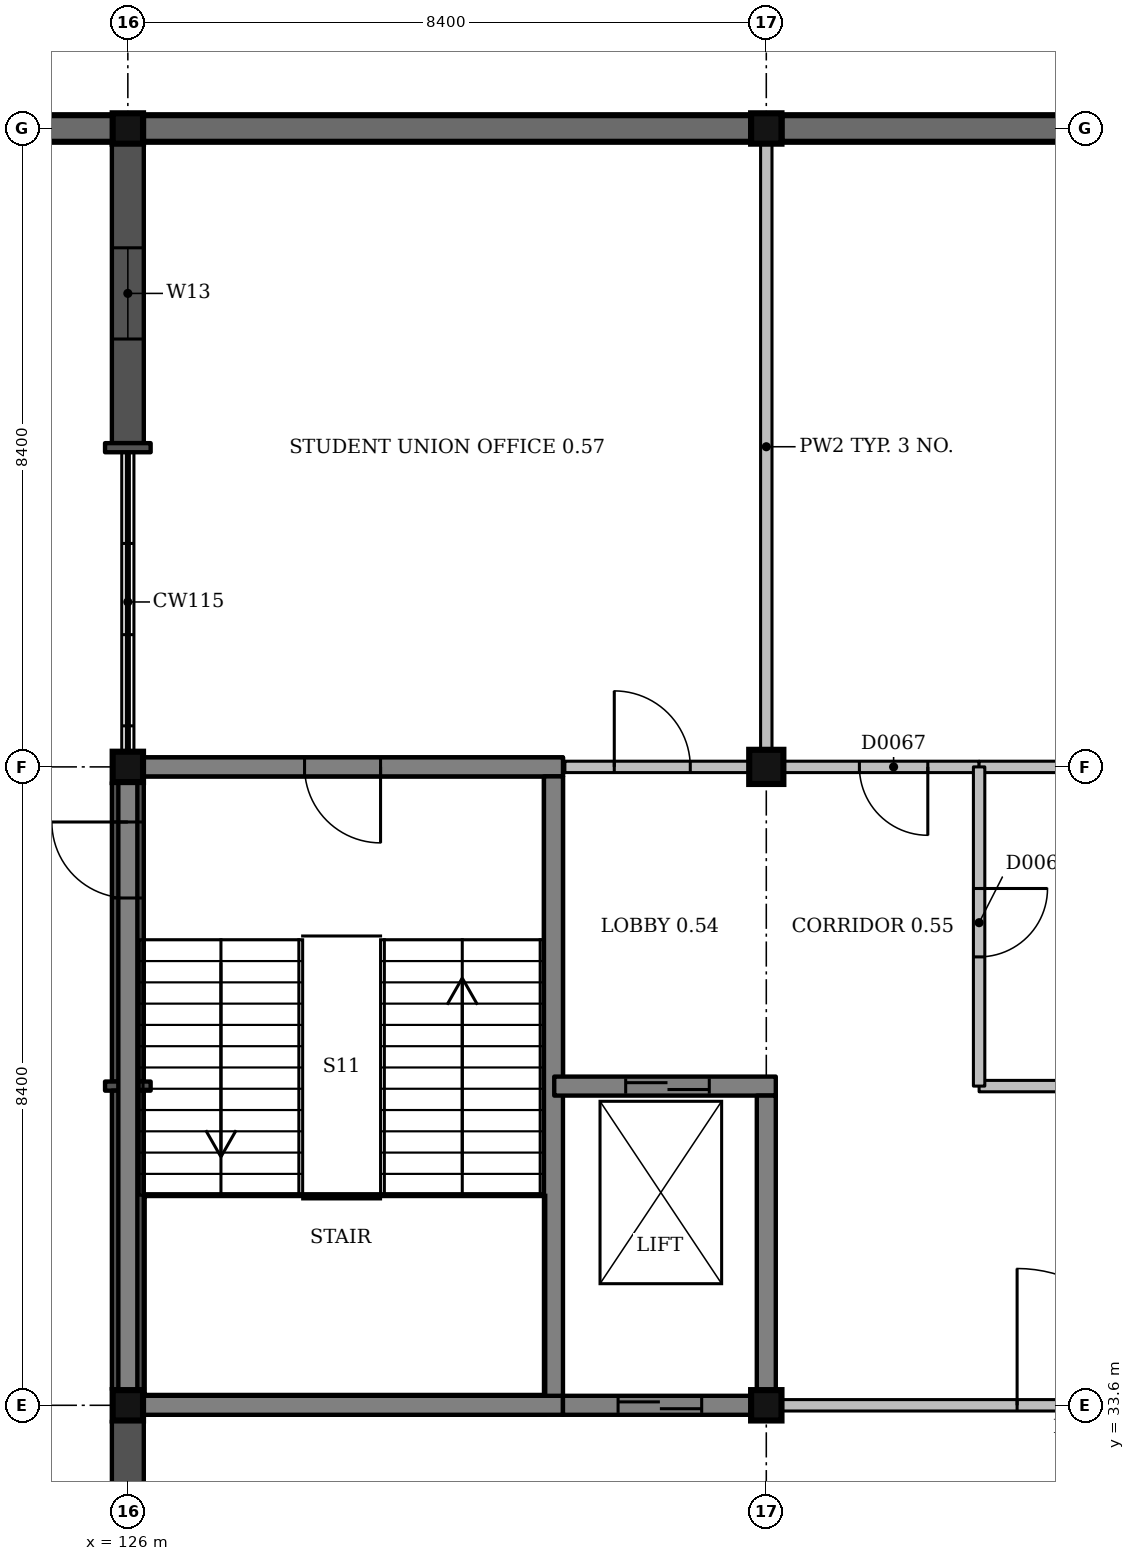
"""IFC4 building model, lengths in metres.
Left out: names, types, materials, properties, quantities, classifications, styles, units other than length and angle.
Written with IfcOpenShell. Run it as: python <this file> out.ifc"""

import sys

from ifc_helpers import new_model, si_unit, direction, frame, frame_2d, origin, origin_2d, place, context, subcontext, project, spatial, rectangle, extrude, element, fill, save


model = new_model("IFC4")
c1 = context("Model", 3, precision=1e-05, world=origin(), true_north=direction((0.0, 1.0)))
c2 = subcontext(c1, "Body", "Model", "MODEL_VIEW")
j1 = project(units=[si_unit("LENGTHUNIT", "METRE"), si_unit("PLANEANGLEUNIT", "RADIAN")], contexts=[c1])
p1 = place(None, origin())
s1 = spatial("IfcSite", under=j1, at=p1, CompositionType="ELEMENT")
p2 = place(p1, origin())
s2 = spatial("IfcBuilding", under=s1, at=p2, CompositionType="ELEMENT")
p3 = place(p2, origin())
s3 = spatial("IfcBuildingStorey", under=s2, at=p3, CompositionType="ELEMENT", Elevation=0.0)
for number, where, z_axis, x_axis in (
    (1, (126.0, 33.6, -1.5), (0.0, 0.0, 1.0), (1.0, 0.0, 0.0)),
    (2, (126.0, 42.0, -1.5), (0.0, 0.0, 1.0), (1.0, 0.0, 0.0)),
):
    element("IfcColumn", number, at=place(p3, frame(where, z_axis=z_axis, x_axis=x_axis)), inside=s3, PredefinedType="COLUMN", context=c2, shape_type="SweptSolid", body=[
        extrude(rectangle(XDim=0.4, YDim=0.4, at=origin_2d()), origin(), (0.0, 0.0, 1.0), 6.0),
    ])
p4 = place(p3, frame((126.0, 50.4, -0.25), z_axis=(0.0, 0.0, 1.0), x_axis=(1.0, 0.0, 0.0)))
e3 = element("IfcColumn", 3, at=p4, inside=s3, PredefinedType="COLUMN", context=c2, shape_type="SweptSolid", body=[
    extrude(rectangle(XDim=0.4, YDim=0.4, at=origin_2d()), origin(), (0.0, 0.0, 1.0), 4.75),
])
p5 = place(p3, frame((134.4, 33.6, -1.5), z_axis=(0.0, 0.0, 1.0), x_axis=(1.0, 0.0, 0.0)))
e4 = element("IfcColumn", 4, at=p5, inside=s3, PredefinedType="COLUMN", context=c2, shape_type="SweptSolid", body=[
    extrude(rectangle(XDim=0.4, YDim=0.4, at=origin_2d()), origin(), (0.0, 0.0, 1.0), 6.0),
])
p6 = place(p3, frame((134.4, 42.0, -1.5), z_axis=(0.0, 0.0, 1.0), x_axis=(1.0, 0.0, 0.0)))
e5 = element("IfcColumn", 5, at=p6, inside=s3, PredefinedType="COLUMN", context=c2, shape_type="SweptSolid", body=[
    extrude(rectangle(XDim=0.45, YDim=0.45, at=origin_2d()), origin(), (0.0, 0.0, 1.0), 6.0),
])
p7 = place(p3, frame((134.4, 50.4, -0.25), z_axis=(0.0, 0.0, 1.0), x_axis=(1.0, 0.0, 0.0)))
e6 = element("IfcColumn", 6, at=p7, inside=s3, PredefinedType="COLUMN", context=c2, shape_type="SweptSolid", body=[
    extrude(rectangle(XDim=0.4, YDim=0.4, at=origin_2d()), origin(), (0.0, 0.0, 1.0), 4.75),
])
p8 = place(p3, frame((131.5, 33.6, 0.0), z_axis=(0.0, 0.0, 1.0), x_axis=(1.0, 0.0, 0.0)))
e7 = element("IfcWall", 7, at=p8, inside=s3, PredefinedType="SHEAR", context=c2, shape_type="SweptSolid", body=[
    extrude(rectangle(XDim=2.7, YDim=0.2, at=frame_2d((1.35, 0.0))), origin(), (0.0, 0.0, 1.0), 4.5),
])
p9 = place(p8, frame((0.95, 0.0, 0.0)))
e8 = element("IfcOpeningElement", 8, at=p9, cuts=e7, PredefinedType="OPENING", context=c2, shape_type="SweptSolid", body=[
    extrude(rectangle(XDim=1.1, YDim=2.1, at=frame_2d((0.55, 1.05))), frame((0.0, 0.11, 0.0), z_axis=(0.0, -1.0, 0.0), x_axis=(1.0, 0.0, 0.0)), (0.0, 0.0, 1.0), 0.22),
])
p10 = place(p3, frame((131.5, 37.8, 0.0), z_axis=(0.0, 0.0, 1.0), x_axis=(1.0, 0.0, 0.0)))
e9 = element("IfcWall", 9, at=p10, inside=s3, PredefinedType="SHEAR", context=c2, shape_type="SweptSolid", body=[
    extrude(rectangle(XDim=3.0, YDim=0.2, at=frame_2d((1.5, 0.0))), origin(), (0.0, 0.0, 1.0), 4.5),
])
p11 = place(p10, frame((1.05, 0.0, 0.0)))
e10 = element("IfcOpeningElement", 10, at=p11, cuts=e9, PredefinedType="OPENING", context=c2, shape_type="SweptSolid", body=[
    extrude(rectangle(XDim=1.1, YDim=2.1, at=frame_2d((0.55, 1.05))), frame((0.0, 0.11, 0.0), z_axis=(0.0, -1.0, 0.0), x_axis=(1.0, 0.0, 0.0)), (0.0, 0.0, 1.0), 0.22),
])
p12 = place(p3, frame((131.6, 33.7, 0.0), z_axis=(0.0, 0.0, 1.0), x_axis=(0.0, 1.0, 0.0)))
e11 = element("IfcWall", 11, at=p12, inside=s3, PredefinedType="SHEAR", context=c2, shape_type="SweptSolid", body=[
    extrude(rectangle(XDim=4.0, YDim=0.2, at=frame_2d((2.0, 0.0))), origin(), (0.0, 0.0, 1.0), 4.5),
])
p13 = place(p3, frame((134.4, 33.8, 0.0), z_axis=(0.0, 0.0, 1.0), x_axis=(0.0, 1.0, 0.0)))
e12 = element("IfcWall", 12, at=p13, inside=s3, PredefinedType="SHEAR", context=c2, shape_type="SweptSolid", body=[
    extrude(rectangle(XDim=3.9, YDim=0.2, at=frame_2d((1.95, 0.0))), origin(), (0.0, 0.0, 1.0), 4.5),
])
p14 = place(p3, frame((126.2, 33.6, 0.0), z_axis=(0.0, 0.0, 1.0), x_axis=(1.0, 0.0, 0.0)))
e13 = element("IfcWall", 13, at=p14, inside=s3, PredefinedType="SHEAR", context=c2, shape_type="SweptSolid", body=[
    extrude(rectangle(XDim=5.3, YDim=0.25, at=frame_2d((2.65, 0.0))), origin(), (0.0, 0.0, 1.0), 4.5),
])
p15 = place(p3, frame((126.2, 42.0, 0.0), z_axis=(0.0, 0.0, 1.0), x_axis=(1.0, 0.0, 0.0)))
e14 = element("IfcWall", 14, at=p15, inside=s3, PredefinedType="SHEAR", context=c2, shape_type="SweptSolid", body=[
    extrude(rectangle(XDim=5.525, YDim=0.25, at=frame_2d((2.763, 0.0))), origin(), (0.0, 0.0, 1.0), 4.5),
])
p16 = place(p15, frame((2.125, 0.0, 0.0)))
e15 = element("IfcOpeningElement", 15, at=p16, cuts=e14, PredefinedType="OPENING", context=c2, shape_type="SweptSolid", body=[
    extrude(rectangle(XDim=1.0, YDim=2.1, at=frame_2d((0.5, 1.05))), frame((0.0, 0.135, 0.0), z_axis=(0.0, -1.0, 0.0), x_axis=(1.0, 0.0, 0.0)), (0.0, 0.0, 1.0), 0.27),
])
p17 = place(p3, frame((131.6, 37.81, 0.0), z_axis=(0.0, 0.0, 1.0), x_axis=(0.0, 1.0, 0.0)))
e16 = element("IfcWall", 16, at=p17, inside=s3, PredefinedType="SHEAR", context=c2, shape_type="SweptSolid", body=[
    extrude(rectangle(XDim=4.065, YDim=0.25, at=frame_2d((2.032, 0.0))), origin(), (0.0, 0.0, 1.0), 4.5),
])
for number, where, z_axis, x_axis in (
    (17, (125.875, 33.6, -1.5), (0.0, 0.0, 1.0), (1.0, 0.0, 0.0)),
    (18, (125.875, 42.0, -1.5), (0.0, 0.0, 1.0), (1.0, 0.0, 0.0)),
):
    element("IfcWall", number, at=place(p3, frame(where, z_axis=z_axis, x_axis=x_axis)), inside=s3, PredefinedType="SHEAR", context=c2, shape_type="SweptSolid", body=[
        extrude(rectangle(XDim=5.85, YDim=0.25, at=frame_2d((2.925, 0.0))), origin(), (0.0, 0.0, 1.0), 1.5),
    ])
for number, where, z_axis, x_axis in (
    (19, (126.0, 33.725, -1.5), (0.0, 0.0, 1.0), (0.0, 1.0, 0.0)),
    (20, (131.6, 33.725, -1.5), (0.0, 0.0, 1.0), (0.0, 1.0, 0.0)),
):
    element("IfcWall", number, at=place(p3, frame(where, z_axis=z_axis, x_axis=x_axis)), inside=s3, PredefinedType="SHEAR", context=c2, shape_type="SweptSolid", body=[
        extrude(rectangle(XDim=8.15, YDim=0.25, at=frame_2d((4.075, 0.0))), origin(), (0.0, 0.0, 1.0), 1.5),
    ])
p18 = place(p3, frame((131.725, 33.6, -1.5), z_axis=(0.0, 0.0, 1.0), x_axis=(1.0, 0.0, 0.0)))
e21 = element("IfcWall", 21, at=p18, inside=s3, PredefinedType="SHEAR", context=c2, shape_type="SweptSolid", body=[
    extrude(rectangle(XDim=2.8, YDim=0.25, at=frame_2d((1.4, 0.0))), origin(), (0.0, 0.0, 1.0), 1.5),
])
p19 = place(p3, frame((131.61, 37.8, -1.5), z_axis=(0.0, 0.0, 1.0), x_axis=(1.0, 0.0, 0.0)))
e22 = element("IfcWall", 22, at=p19, inside=s3, PredefinedType="SHEAR", context=c2, shape_type="SweptSolid", body=[
    extrude(rectangle(XDim=2.915, YDim=0.25, at=frame_2d((1.458, 0.0))), origin(), (0.0, 0.0, 1.0), 1.5),
])
p20 = place(p3, frame((134.4, 33.725, -1.5), z_axis=(0.0, 0.0, 1.0), x_axis=(0.0, 1.0, 0.0)))
e23 = element("IfcWall", 23, at=p20, inside=s3, PredefinedType="SHEAR", context=c2, shape_type="SweptSolid", body=[
    extrude(rectangle(XDim=3.95, YDim=0.25, at=frame_2d((1.975, 0.0))), origin(), (0.0, 0.0, 1.0), 1.5),
])
for number, where, z_axis, x_axis in (
    (24, (142.6, 50.4, -0.25), (0.0, 0.0, 1.0), (-1.0, 0.0, 0.0)),
    (25, (134.2, 50.4, -0.25), (0.0, 0.0, 1.0), (-1.0, 0.0, 0.0)),
):
    element("IfcWall", number, at=place(p3, frame(where, z_axis=z_axis, x_axis=x_axis)), inside=s3, PredefinedType="SOLIDWALL", context=c2, shape_type="SweptSolid", body=[
        extrude(rectangle(XDim=8.0, YDim=0.35, at=frame_2d((4.0, 0.0))), origin(), (0.0, 0.0, 1.0), 3.75),
    ])
p21 = place(p3, frame((117.6, 50.4, 0.0), z_axis=(0.0, 0.0, 1.0), x_axis=(1.0, 0.0, 0.0)))
e26 = element("IfcWall", 26, at=p21, inside=s3, PredefinedType="SOLIDWALL", context=c2, shape_type="SweptSolid", body=[
    extrude(rectangle(XDim=8.4, YDim=0.35, at=frame_2d((4.2, 0.0))), origin(), (0.0, 0.0, 1.0), 4.25),
])
p22 = place(p3, frame((126.0, 50.2, 0.0), z_axis=(0.0, 0.0, 1.0), x_axis=(0.0, -1.0, 0.0)))
e27 = element("IfcWall", 27, at=p22, inside=s3, PredefinedType="SOLIDWALL", context=c2, shape_type="SweptSolid", body=[
    extrude(rectangle(XDim=3.94, YDim=0.42, at=frame_2d((1.97, 0.0))), origin(), (0.0, 0.0, 1.0), 3.5),
])
p23 = place(p22, frame((1.37, 0.0, 0.9)))
e28 = element("IfcOpeningElement", 28, at=p23, cuts=e27, PredefinedType="OPENING", context=c2, shape_type="SweptSolid", body=[
    extrude(rectangle(XDim=1.2, YDim=2.1, at=frame_2d((0.6, 1.05))), frame((0.0, 0.22, 0.0), z_axis=(0.0, -1.0, 0.0), x_axis=(1.0, 0.0, 0.0)), (0.0, 0.0, 1.0), 0.44),
])
p24 = place(p3, frame((126.0, 46.26, 0.0), z_axis=(0.0, 0.0, 1.0), x_axis=(0.0, -1.0, 0.0)))
e29 = element("IfcWall", 29, at=p24, inside=s3, PredefinedType="SOLIDWALL", context=c2, shape_type="SweptSolid", body=[
    extrude(rectangle(XDim=0.12, YDim=0.6, at=frame_2d((0.06, 0.0))), origin(), (0.0, 0.0, 1.0), 3.5),
])
p25 = place(p3, frame((126.0, 41.8, 0.0), z_axis=(0.0, 0.0, 1.0), x_axis=(0.0, -1.0, 0.0)))
e30 = element("IfcWall", 30, at=p25, inside=s3, PredefinedType="SOLIDWALL", context=c2, shape_type="SweptSolid", body=[
    extrude(rectangle(XDim=3.94, YDim=0.42, at=frame_2d((1.97, 0.0))), origin(), (0.0, 0.0, 1.0), 3.75),
])
p26 = place(p25, frame((1.525, 0.0, 0.0), z_axis=(0.0, 0.0, 1.0), x_axis=(-1.0, 0.0, 0.0)))
e31 = element("IfcOpeningElement", 31, at=p26, cuts=e30, PredefinedType="OPENING", context=c2, shape_type="SweptSolid", body=[
    extrude(rectangle(XDim=1.0, YDim=2.1, at=frame_2d((0.5, 1.05))), frame((0.0, 0.22, 0.0), z_axis=(0.0, -1.0, 0.0), x_axis=(1.0, 0.0, 0.0)), (0.0, 0.0, 1.0), 0.44),
])
p27 = place(p3, frame((126.0, 37.86, 0.0), z_axis=(0.0, 0.0, 1.0), x_axis=(0.0, -1.0, 0.0)))
e32 = element("IfcWall", 32, at=p27, inside=s3, PredefinedType="SOLIDWALL", context=c2, shape_type="SweptSolid", body=[
    extrude(rectangle(XDim=0.12, YDim=0.6, at=frame_2d((0.06, 0.0))), origin(), (0.0, 0.0, 1.0), 3.75),
])
p28 = place(p3, frame((126.0, 37.74, 0.0), z_axis=(0.0, 0.0, 1.0), x_axis=(0.0, -1.0, 0.0)))
e33 = element("IfcWall", 33, at=p28, inside=s3, PredefinedType="SOLIDWALL", context=c2, shape_type="SweptSolid", body=[
    extrude(rectangle(XDim=3.94, YDim=0.42, at=frame_2d((1.97, 0.0))), origin(), (0.0, 0.0, 1.0), 3.75),
])
p29 = place(p3, frame((126.0, 33.4, 0.0), z_axis=(0.0, 0.0, 1.0), x_axis=(0.0, -1.0, 0.0)))
e34 = element("IfcWall", 34, at=p29, inside=s3, PredefinedType="SOLIDWALL", context=c2, shape_type="SweptSolid", body=[
    extrude(rectangle(XDim=3.94, YDim=0.42, at=frame_2d((1.97, 0.0))), origin(), (0.0, 0.0, 1.0), 3.75),
])
p30 = place(p29, frame((1.47, 0.0, 0.0)))
e35 = element("IfcOpeningElement", 35, at=p30, cuts=e34, PredefinedType="OPENING", context=c2, shape_type="SweptSolid", body=[
    extrude(rectangle(XDim=1.0, YDim=2.1, at=frame_2d((0.5, 1.05))), frame((0.0, 0.22, 0.0), z_axis=(0.0, -1.0, 0.0), x_axis=(1.0, 0.0, 0.0)), (0.0, 0.0, 1.0), 0.44),
])
p31 = place(p3, frame((134.6, 33.6, 0.0), z_axis=(0.0, 0.0, 1.0), x_axis=(1.0, 0.0, 0.0)))
e36 = element("IfcWall", 36, at=p31, inside=s3, PredefinedType="PARTITIONING", context=c2, shape_type="SweptSolid", body=[
    extrude(rectangle(XDim=8.0, YDim=0.15, at=frame_2d((4.0, 0.0))), origin(), (0.0, 0.0, 1.0), 3.5),
])
p32 = place(p31, frame((3.1, 0.0, 0.0)))
e37 = element("IfcOpeningElement", 37, at=p32, cuts=e36, PredefinedType="OPENING", context=c2, shape_type="SweptSolid", body=[
    extrude(rectangle(XDim=1.8, YDim=2.1, at=frame_2d((0.9, 1.05))), frame((0.0, 0.085, 0.0), z_axis=(0.0, -1.0, 0.0), x_axis=(1.0, 0.0, 0.0)), (0.0, 0.0, 1.0), 0.17),
])
p33 = place(p3, frame((137.2, 37.8, 0.0), z_axis=(0.0, 0.0, 1.0), x_axis=(1.0, 0.0, 0.0)))
e38 = element("IfcWall", 38, at=p33, inside=s3, PredefinedType="PARTITIONING", context=c2, shape_type="SweptSolid", body=[
    extrude(rectangle(XDim=16.65, YDim=0.15, at=frame_2d((8.325, 0.0))), origin(), (0.0, 0.0, 1.0), 3.55),
])
p34 = place(p3, frame((134.625, 42.0, 0.0), z_axis=(0.0, 0.0, 1.0), x_axis=(1.0, 0.0, 0.0)))
e39 = element("IfcWall", 39, at=p34, inside=s3, PredefinedType="PARTITIONING", context=c2, shape_type="SweptSolid", body=[
    extrude(rectangle(XDim=2.575, YDim=0.15, at=frame_2d((1.288, 0.0))), origin(), (0.0, 0.0, 1.0), 3.55),
])
p35 = place(p34, frame((1.0, 0.0, 0.0)))
e40 = element("IfcOpeningElement", 40, at=p35, cuts=e39, PredefinedType="OPENING", context=c2, shape_type="SweptSolid", body=[
    extrude(rectangle(XDim=0.9, YDim=2.1, at=frame_2d((0.45, 1.05))), frame((0.0, 0.085, 0.0), z_axis=(0.0, -1.0, 0.0), x_axis=(1.0, 0.0, 0.0)), (0.0, 0.0, 1.0), 0.17),
])
p36 = place(p3, frame((131.75, 42.0, 0.0), z_axis=(0.0, 0.0, 1.0), x_axis=(1.0, 0.0, 0.0)))
e41 = element("IfcWall", 41, at=p36, inside=s3, PredefinedType="PARTITIONING", context=c2, shape_type="SweptSolid", body=[
    extrude(rectangle(XDim=2.425, YDim=0.15, at=frame_2d((1.212, 0.0))), origin(), (0.0, 0.0, 1.0), 3.65),
])
p37 = place(p36, frame((0.65, 0.0, 0.0)))
e42 = element("IfcOpeningElement", 42, at=p37, cuts=e41, PredefinedType="OPENING", context=c2, shape_type="SweptSolid", body=[
    extrude(rectangle(XDim=1.0, YDim=2.1, at=frame_2d((0.5, 1.05))), frame((0.0, 0.085, 0.0), z_axis=(0.0, -1.0, 0.0), x_axis=(1.0, 0.0, 0.0)), (0.0, 0.0, 1.0), 0.17),
])
p38 = place(p3, frame((137.2, 42.0, 0.0), z_axis=(0.0, 0.0, 1.0), x_axis=(1.0, 0.0, 0.0)))
e43 = element("IfcWall", 43, at=p38, inside=s3, PredefinedType="PARTITIONING", context=c2, shape_type="SweptSolid", body=[
    extrude(rectangle(XDim=5.375, YDim=0.15, at=frame_2d((2.688, 0.0))), origin(), (0.0, 0.0, 1.0), 3.55),
])
p39 = place(p3, frame((134.4, 42.225, 0.0), z_axis=(0.0, 0.0, 1.0), x_axis=(0.0, 1.0, 0.0)))
e44 = element("IfcWall", 44, at=p39, inside=s3, PredefinedType="PARTITIONING", context=c2, shape_type="SweptSolid", body=[
    extrude(rectangle(XDim=7.975, YDim=0.15, at=frame_2d((3.987, 0.0))), origin(), (0.0, 0.0, 1.0), 3.55),
])
p40 = place(p3, frame((137.2, 37.8, 0.0), z_axis=(0.0, 0.0, 1.0), x_axis=(0.0, 1.0, 0.0)))
e45 = element("IfcWall", 45, at=p40, inside=s3, PredefinedType="PARTITIONING", context=c2, shape_type="SweptSolid", body=[
    extrude(rectangle(XDim=4.2, YDim=0.15, at=frame_2d((2.1, 0.0))), origin(), (0.0, 0.0, 1.0), 3.55),
])
p41 = place(p40, frame((1.7, 0.0, 0.0)))
e46 = element("IfcOpeningElement", 46, at=p41, cuts=e45, PredefinedType="OPENING", context=c2, shape_type="SweptSolid", body=[
    extrude(rectangle(XDim=0.9, YDim=2.1, at=frame_2d((0.45, 1.05))), frame((0.0, 0.085, 0.0), z_axis=(0.0, -1.0, 0.0), x_axis=(1.0, 0.0, 0.0)), (0.0, 0.0, 1.0), 0.17),
])
p42 = place(p23, origin())
e47 = element("IfcWindow", 47, at=p42, inside=s3, PartitioningType="SINGLE_PANEL", PredefinedType="WINDOW", context=c2, shape_type="SweptSolid", body=[
    extrude(rectangle(XDim=1.2, YDim=2.1, at=frame_2d((0.6, 1.05))), frame((0.0, 0.15, 0.0), z_axis=(0.0, -1.0, 0.0), x_axis=(1.0, 0.0, 0.0)), (0.0, 0.0, 1.0), 0.06),
])
fill(e28, e47)
p43 = place(p32, origin())
e48 = element("IfcDoor", 48, at=p43, inside=s3, OperationType="DOUBLE_DOOR_SINGLE_SWING", PredefinedType="DOOR", context=c2, shape_type="SweptSolid", body=[
    extrude(rectangle(XDim=1.8, YDim=2.1, at=frame_2d((0.9, 1.05))), frame((0.0, 0.025, 0.0), z_axis=(0.0, -1.0, 0.0), x_axis=(1.0, 0.0, 0.0)), (0.0, 0.0, 1.0), 0.05),
])
fill(e37, e48)
p44 = place(p41, origin())
e49 = element("IfcDoor", 49, at=p44, inside=s3, OperationType="SINGLE_SWING_RIGHT", PredefinedType="DOOR", context=c2, shape_type="SweptSolid", body=[
    extrude(rectangle(XDim=0.9, YDim=2.1, at=frame_2d((0.45, 1.05))), frame((0.0, 0.025, 0.0), z_axis=(0.0, -1.0, 0.0), x_axis=(1.0, 0.0, 0.0)), (0.0, 0.0, 1.0), 0.05),
])
fill(e46, e49)
p45 = place(p37, origin())
e50 = element("IfcDoor", 50, at=p45, inside=s3, OperationType="SINGLE_SWING_LEFT", PredefinedType="DOOR", context=c2, shape_type="SweptSolid", body=[
    extrude(rectangle(XDim=1.0, YDim=2.1, at=frame_2d((0.5, 1.05))), frame((0.0, 0.025, 0.0), z_axis=(0.0, -1.0, 0.0), x_axis=(1.0, 0.0, 0.0)), (0.0, 0.0, 1.0), 0.05),
])
fill(e42, e50)
p46 = place(p35, origin())
e51 = element("IfcDoor", 51, at=p46, inside=s3, OperationType="SINGLE_SWING_RIGHT", PredefinedType="DOOR", context=c2, shape_type="SweptSolid", body=[
    extrude(rectangle(XDim=0.9, YDim=2.1, at=frame_2d((0.45, 1.05))), frame((0.0, 0.025, 0.0), z_axis=(0.0, -1.0, 0.0), x_axis=(1.0, 0.0, 0.0)), (0.0, 0.0, 1.0), 0.05),
])
fill(e40, e51)
p47 = place(p16, origin())
e52 = element("IfcDoor", 52, at=p47, inside=s3, OperationType="SINGLE_SWING_RIGHT", PredefinedType="DOOR", context=c2, shape_type="SweptSolid", body=[
    extrude(rectangle(XDim=1.0, YDim=2.1, at=frame_2d((0.5, 1.05))), frame((0.0, 0.025, 0.0), z_axis=(0.0, -1.0, 0.0), x_axis=(1.0, 0.0, 0.0)), (0.0, 0.0, 1.0), 0.05),
])
fill(e15, e52)
p48 = place(p26, origin())
e53 = element("IfcDoor", 53, at=p48, inside=s3, OperationType="SINGLE_SWING_LEFT", PredefinedType="DOOR", context=c2, shape_type="SweptSolid", body=[
    extrude(rectangle(XDim=1.0, YDim=2.1, at=frame_2d((0.5, 1.05))), frame((0.0, 0.025, 0.0), z_axis=(0.0, -1.0, 0.0), x_axis=(1.0, 0.0, 0.0)), (0.0, 0.0, 1.0), 0.05),
])
fill(e31, e53)
p49 = place(p9, origin())
e54 = element("IfcDoor", 54, at=p49, inside=s3, OperationType="SLIDING_TO_RIGHT", PredefinedType="DOOR", context=c2, shape_type="SweptSolid", body=[
    extrude(rectangle(XDim=1.1, YDim=2.1, at=frame_2d((0.55, 1.05))), frame((0.0, 0.025, 0.0), z_axis=(0.0, -1.0, 0.0), x_axis=(1.0, 0.0, 0.0)), (0.0, 0.0, 1.0), 0.05),
])
fill(e8, e54)
p50 = place(p11, origin())
e55 = element("IfcDoor", 55, at=p50, inside=s3, OperationType="SLIDING_TO_LEFT", PredefinedType="DOOR", context=c2, shape_type="SweptSolid", body=[
    extrude(rectangle(XDim=1.1, YDim=2.1, at=frame_2d((0.55, 1.05))), frame((0.0, 0.025, 0.0), z_axis=(0.0, -1.0, 0.0), x_axis=(1.0, 0.0, 0.0)), (0.0, 0.0, 1.0), 0.05),
])
fill(e10, e55)
save(model, sys.argv[1])
